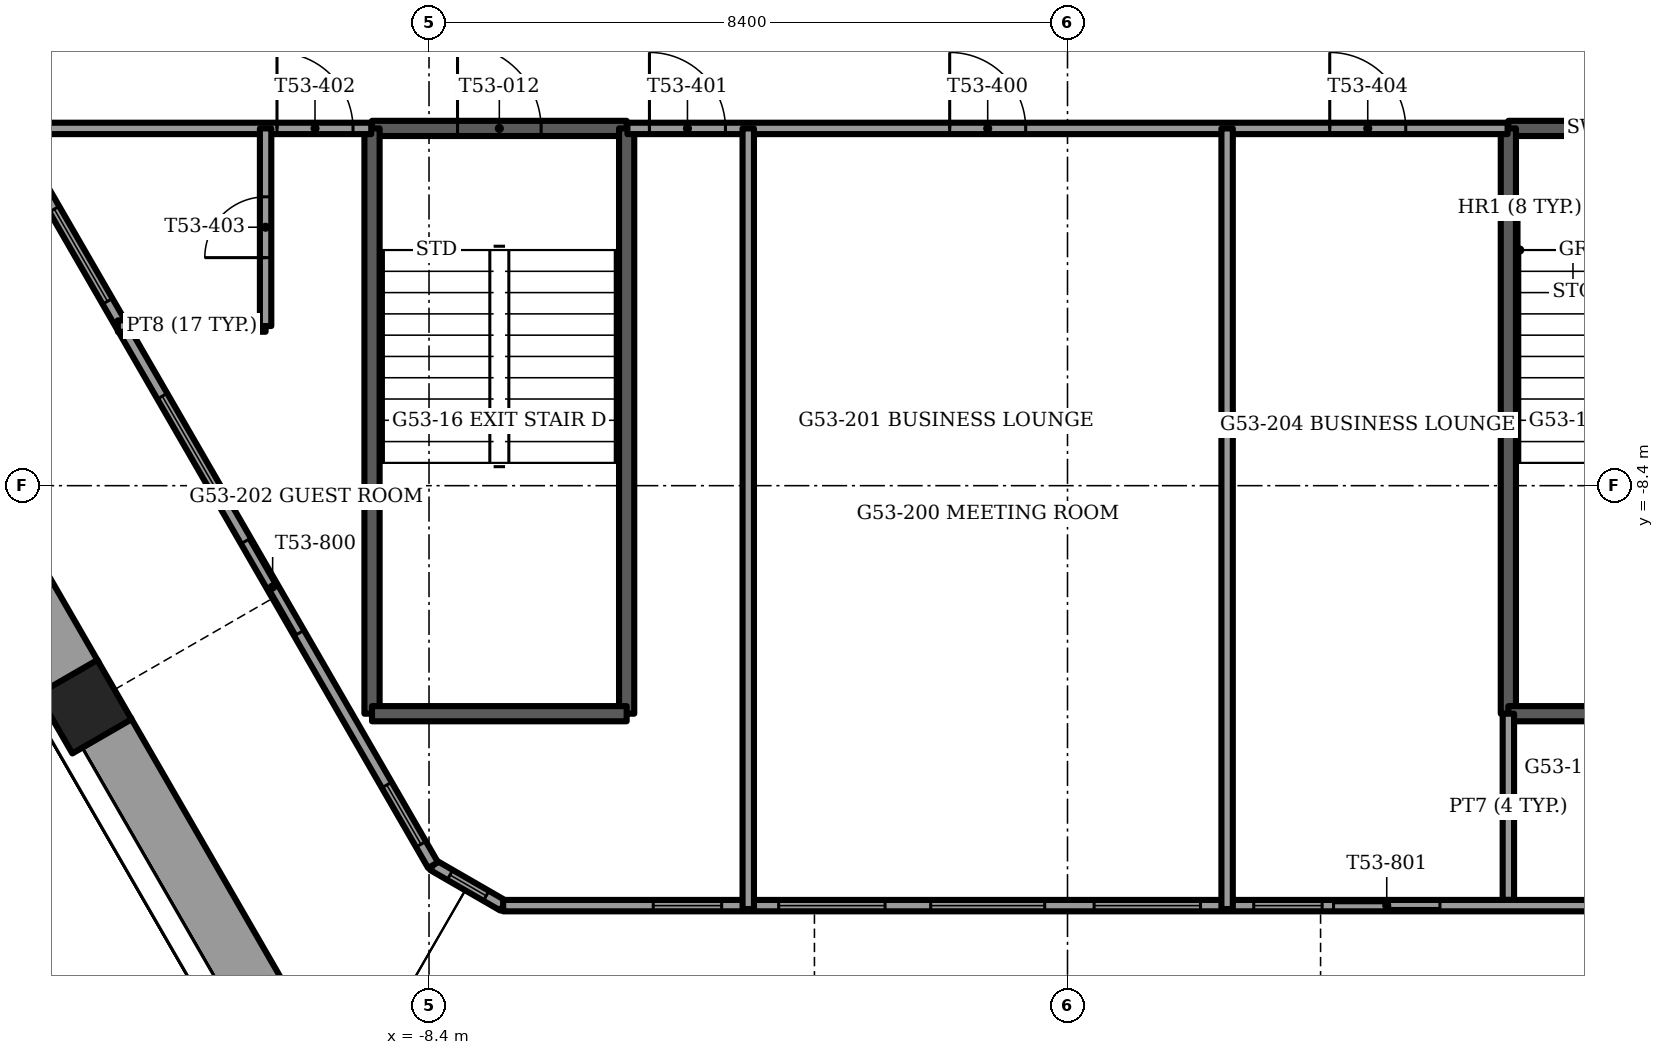
"""IFC4 building model, lengths in metres.
Left out: names, types, materials, properties, quantities, classifications, styles, units other than length and angle.
Written with IfcOpenShell. Run it as: python <this file> out.ifc"""

import sys

from ifc_helpers import new_model, si_unit, direction, frame, frame_2d, origin, origin_2d, place, context, subcontext, project, spatial, rectangle, extrude, element, fill, save


model = new_model("IFC4")
c1 = context("Model", 3, precision=1e-05, world=origin(), true_north=direction((0.0, 1.0)))
c2 = subcontext(c1, "Body", "Model", "MODEL_VIEW")
j1 = project(units=[si_unit("LENGTHUNIT", "METRE"), si_unit("PLANEANGLEUNIT", "RADIAN")], contexts=[c1])
p1 = place(None, origin())
s1 = spatial("IfcSite", under=j1, at=p1, CompositionType="ELEMENT")
p2 = place(p1, origin())
s2 = spatial("IfcBuilding", under=s1, at=p2, CompositionType="ELEMENT")
p3 = place(p2, frame((0.0, 0.0, 214.5)))
s3 = spatial("IfcBuildingStorey", under=s2, at=p3, CompositionType="ELEMENT", Elevation=214.5)
p4 = place(p3, frame((-12.928, -11.308, -1.2), z_axis=(0.0, 0.0, 1.0), x_axis=(-0.5, 0.866025403784, 0.0)))
e1 = element("IfcColumn", 1, at=p4, inside=s3, PredefinedType="COLUMN", context=c2, shape_type="SweptSolid", body=[
    extrude(rectangle(XDim=0.9, YDim=0.9, at=origin_2d()), origin(), (0.0, 0.0, 1.0), 3.75),
])
p5 = place(p3, frame((-16.047, -5.906, 0.0), z_axis=(0.0, 0.0, 1.0), x_axis=(0.500015433515, -0.866016493057, 0.0)))
e2 = element("IfcWall", 2, at=p5, inside=s3, PredefinedType="PARAPET", context=c2, shape_type="SweptSolid", body=[
    extrude(rectangle(XDim=5.819, YDim=0.9, at=frame_2d((2.909, 0.0))), origin(), (0.0, 0.0, 1.0), 1.1),
])
p6 = place(p3, frame((-12.718, -11.672, 0.0), z_axis=(0.0, 0.0, 1.0), x_axis=(0.50000722722, -0.866021231107, 0.0)))
e3 = element("IfcWall", 3, at=p6, inside=s3, PredefinedType="PARAPET", context=c2, shape_type="SweptSolid", body=[
    extrude(rectangle(XDim=5.492, YDim=0.9, at=frame_2d((2.746, 0.0))), origin(), (0.0, 0.0, 1.0), 1.1),
])
p7 = place(p3, frame((-15.772, -0.532, 0.0), z_axis=(0.0, 0.0, 1.0), x_axis=(0.500000919504, -0.866024872908, 0.0)))
e4 = element("IfcWall", 4, at=p7, inside=s3, PredefinedType="SOLIDWALL", context=c2, shape_type="SweptSolid", body=[
    extrude(rectangle(XDim=14.85, YDim=0.15, at=frame_2d((7.425, 0.0))), origin(), (0.0, 0.0, 1.0), 3.45),
])
p8 = place(p7, frame((4.884, 0.0, 0.15)))
e5 = element("IfcOpeningElement", 5, at=p8, cuts=e4, PredefinedType="OPENING", context=c2, shape_type="SweptSolid", body=[
    extrude(rectangle(XDim=1.4, YDim=2.85, at=frame_2d((0.7, 1.425))), frame((0.0, 0.075, 0.0), z_axis=(0.0, -1.0, 0.0), x_axis=(1.0, 0.0, 0.0)), (0.0, 0.0, 1.0), 0.15),
])
p9 = place(p7, frame((7.725, 0.0, 0.15)))
e6 = element("IfcOpeningElement", 6, at=p9, cuts=e4, PredefinedType="OPENING", context=c2, shape_type="SweptSolid", body=[
    extrude(rectangle(XDim=1.5, YDim=2.85, at=frame_2d((0.75, 1.425))), frame((0.0, 0.075, 0.0), z_axis=(0.0, -1.0, 0.0), x_axis=(1.0, 0.0, 0.0)), (0.0, 0.0, 1.0), 0.15),
])
p10 = place(p7, frame((9.925, 0.0, 0.0)))
e7 = element("IfcOpeningElement", 7, at=p10, cuts=e4, PredefinedType="OPENING", context=c2, shape_type="SweptSolid", body=[
    extrude(rectangle(XDim=1.4, YDim=2.4, at=frame_2d((0.7, 1.2))), frame((0.0, 0.075, 0.0), z_axis=(0.0, -1.0, 0.0), x_axis=(1.0, 0.0, 0.0)), (0.0, 0.0, 1.0), 0.15),
])
p11 = place(p7, frame((0.812, 0.0, 0.15)))
e8 = element("IfcOpeningElement", 8, at=p11, cuts=e4, PredefinedType="OPENING", context=c2, shape_type="SweptSolid", body=[
    extrude(rectangle(XDim=1.5, YDim=2.73, at=frame_2d((0.75, 1.365))), frame((0.0, 0.075, 0.0), z_axis=(0.0, -1.0, 0.0), x_axis=(1.0, 0.0, 0.0)), (0.0, 0.0, 1.0), 0.15),
])
p12 = place(p7, frame((13.632, 0.0, 0.15)))
e9 = element("IfcOpeningElement", 9, at=p12, cuts=e4, PredefinedType="OPENING", context=c2, shape_type="SweptSolid", body=[
    extrude(rectangle(XDim=0.9, YDim=2.73, at=frame_2d((0.45, 1.365))), frame((0.0, 0.075, 0.0), z_axis=(0.0, -1.0, 0.0), x_axis=(1.0, 0.0, 0.0)), (0.0, 0.0, 1.0), 0.15),
])
p13 = place(p3, frame((-7.425, -13.925, 0.0), z_axis=(0.0, 0.0, 1.0), x_axis=(1.0, 0.0, 0.0)))
e10 = element("IfcWall", 10, at=p13, inside=s3, PredefinedType="SOLIDWALL", context=c2, shape_type="SweptSolid", body=[
    extrude(rectangle(XDim=14.85, YDim=0.15, at=frame_2d((7.425, 0.0))), origin(), (0.0, 0.0, 1.0), 3.45),
])
p14 = place(p13, frame((1.975, 0.0, 0.15)))
e11 = element("IfcOpeningElement", 11, at=p14, cuts=e10, PredefinedType="OPENING", context=c2, shape_type="SweptSolid", body=[
    extrude(rectangle(XDim=0.9, YDim=2.85, at=frame_2d((0.45, 1.425))), frame((0.0, 0.075, 0.0), z_axis=(0.0, -1.0, 0.0), x_axis=(1.0, 0.0, 0.0)), (0.0, 0.0, 1.0), 0.15),
])
p15 = place(p13, frame((3.625, 0.0, 0.15)))
e12 = element("IfcOpeningElement", 12, at=p15, cuts=e10, PredefinedType="OPENING", context=c2, shape_type="SweptSolid", body=[
    extrude(rectangle(XDim=1.4, YDim=2.85, at=frame_2d((0.7, 1.425))), frame((0.0, 0.075, 0.0), z_axis=(0.0, -1.0, 0.0), x_axis=(1.0, 0.0, 0.0)), (0.0, 0.0, 1.0), 0.15),
])
p16 = place(p13, frame((5.625, 0.0, 0.15)))
e13 = element("IfcOpeningElement", 13, at=p16, cuts=e10, PredefinedType="OPENING", context=c2, shape_type="SweptSolid", body=[
    extrude(rectangle(XDim=1.5, YDim=2.85, at=frame_2d((0.75, 1.425))), frame((0.0, 0.075, 0.0), z_axis=(0.0, -1.0, 0.0), x_axis=(1.0, 0.0, 0.0)), (0.0, 0.0, 1.0), 0.15),
])
p17 = place(p13, frame((7.775, 0.0, 0.15)))
e14 = element("IfcOpeningElement", 14, at=p17, cuts=e10, PredefinedType="OPENING", context=c2, shape_type="SweptSolid", body=[
    extrude(rectangle(XDim=1.4, YDim=2.85, at=frame_2d((0.7, 1.425))), frame((0.0, 0.075, 0.0), z_axis=(0.0, -1.0, 0.0), x_axis=(1.0, 0.0, 0.0)), (0.0, 0.0, 1.0), 0.15),
])
p18 = place(p13, frame((9.875, 0.0, 0.15)))
e15 = element("IfcOpeningElement", 15, at=p18, cuts=e10, PredefinedType="OPENING", context=c2, shape_type="SweptSolid", body=[
    extrude(rectangle(XDim=0.9, YDim=2.85, at=frame_2d((0.45, 1.425))), frame((0.0, 0.075, 0.0), z_axis=(0.0, -1.0, 0.0), x_axis=(1.0, 0.0, 0.0)), (0.0, 0.0, 1.0), 0.15),
])
p19 = place(p13, frame((10.925, 0.0, 0.0)))
e16 = element("IfcOpeningElement", 16, at=p19, cuts=e10, PredefinedType="OPENING", context=c2, shape_type="SweptSolid", body=[
    extrude(rectangle(XDim=1.4, YDim=2.4, at=frame_2d((0.7, 1.2))), frame((0.0, 0.075, 0.0), z_axis=(0.0, -1.0, 0.0), x_axis=(1.0, 0.0, 0.0)), (0.0, 0.0, 1.0), 0.15),
])
p20 = place(p3, frame((-8.347, -13.393, 0.0), z_axis=(0.0, 0.0, 1.0), x_axis=(0.865990848561, -0.500059846627, 0.0)))
e17 = element("IfcWall", 17, at=p20, inside=s3, PredefinedType="SOLIDWALL", context=c2, shape_type="SweptSolid", body=[
    extrude(rectangle(XDim=1.065, YDim=0.15, at=frame_2d((0.532, 0.0))), origin(), (0.0, 0.0, 1.0), 3.45),
])
p21 = place(p20, frame((0.258, 0.0, 0.15)))
e18 = element("IfcOpeningElement", 18, at=p21, cuts=e17, PredefinedType="OPENING", context=c2, shape_type="SweptSolid", body=[
    extrude(rectangle(XDim=0.55, YDim=2.85, at=frame_2d((0.275, 1.425))), frame((0.0, 0.075, 0.0), z_axis=(0.0, -1.0, 0.0), x_axis=(1.0, 0.0, 0.0)), (0.0, 0.0, 1.0), 0.15),
])
p22 = place(p3, frame((5.8, -3.7, -0.3), z_axis=(0.0, 0.0, 1.0), x_axis=(1.0, 0.0, 0.0)))
e19 = element("IfcWall", 19, at=p22, inside=s3, PredefinedType="SOLIDWALL", context=c2, shape_type="SweptSolid", body=[
    extrude(rectangle(XDim=3.35, YDim=0.2, at=frame_2d((1.675, 0.0))), origin(), (0.0, 0.0, 1.0), 3.75),
])
p23 = place(p22, frame((1.125, 0.0, 0.0)))
e20 = element("IfcOpeningElement", 20, at=p23, cuts=e19, PredefinedType="OPENING", context=c2, shape_type="SweptSolid", body=[
    extrude(rectangle(XDim=1.1, YDim=2.1, at=frame_2d((0.55, 1.05))), frame((0.0, 0.1, 0.0), z_axis=(0.0, -1.0, 0.0), x_axis=(1.0, 0.0, 0.0)), (0.0, 0.0, 1.0), 0.2),
])
p24 = place(p3, frame((5.8, -3.7, -0.3), z_axis=(0.0, 0.0, 1.0), x_axis=(0.0, -1.0, 0.0)))
e21 = element("IfcWall", 21, at=p24, inside=s3, PredefinedType="SOLIDWALL", context=c2, shape_type="SweptSolid", body=[
    extrude(rectangle(XDim=7.7, YDim=0.2, at=frame_2d((3.85, 0.0))), origin(), (0.0, 0.0, 1.0), 3.75),
])
p25 = place(p3, frame((5.8, -11.4, -0.3), z_axis=(0.0, 0.0, 1.0), x_axis=(1.0, 0.0, 0.0)))
e22 = element("IfcWall", 22, at=p25, inside=s3, PredefinedType="SOLIDWALL", context=c2, shape_type="SweptSolid", body=[
    extrude(rectangle(XDim=3.35, YDim=0.2, at=frame_2d((1.675, 0.0))), origin(), (0.0, 0.0, 1.0), 3.75),
])
p26 = place(p3, frame((5.8, -11.4, 0.0), z_axis=(0.0, 0.0, 1.0), x_axis=(0.0, -1.0, 0.0)))
e23 = element("IfcWall", 23, at=p26, inside=s3, PredefinedType="PARTITIONING", context=c2, shape_type="SweptSolid", body=[
    extrude(rectangle(XDim=2.45, YDim=0.15, at=frame_2d((1.225, 0.0))), origin(), (0.0, 0.0, 1.0), 3.45),
])
p27 = place(p3, frame((-9.15, -3.7, -0.3), z_axis=(0.0, 0.0, 1.0), x_axis=(1.0, 0.0, 0.0)))
e24 = element("IfcWall", 24, at=p27, inside=s3, PredefinedType="SOLIDWALL", context=c2, shape_type="SweptSolid", body=[
    extrude(rectangle(XDim=3.35, YDim=0.2, at=frame_2d((1.675, 0.0))), origin(), (0.0, 0.0, 1.0), 3.75),
])
p28 = place(p27, frame((1.125, 0.0, 0.0)))
e25 = element("IfcOpeningElement", 25, at=p28, cuts=e24, PredefinedType="OPENING", context=c2, shape_type="SweptSolid", body=[
    extrude(rectangle(XDim=1.1, YDim=2.1, at=frame_2d((0.55, 1.05))), frame((0.0, 0.1, 0.0), z_axis=(0.0, -1.0, 0.0), x_axis=(1.0, 0.0, 0.0)), (0.0, 0.0, 1.0), 0.2),
])
for number, where, z_axis, x_axis in (
    (26, (-9.15, -3.7, -0.3), (0.0, 0.0, 1.0), (0.0, -1.0, 0.0)),
    (27, (-5.8, -3.7, -0.3), (0.0, 0.0, 1.0), (0.0, -1.0, 0.0)),
):
    element("IfcWall", number, at=place(p3, frame(where, z_axis=z_axis, x_axis=x_axis)), inside=s3, PredefinedType="SOLIDWALL", context=c2, shape_type="SweptSolid", body=[
        extrude(rectangle(XDim=7.7, YDim=0.2, at=frame_2d((3.85, 0.0))), origin(), (0.0, 0.0, 1.0), 3.75),
    ])
p29 = place(p3, frame((-9.15, -11.4, -0.3), z_axis=(0.0, 0.0, 1.0), x_axis=(1.0, 0.0, 0.0)))
e28 = element("IfcWall", 28, at=p29, inside=s3, PredefinedType="SOLIDWALL", context=c2, shape_type="SweptSolid", body=[
    extrude(rectangle(XDim=3.35, YDim=0.2, at=frame_2d((1.675, 0.0))), origin(), (0.0, 0.0, 1.0), 3.75),
])
p30 = place(p3, frame((-12.494, -6.3, 0.0), z_axis=(0.0, 0.0, 1.0), x_axis=(1.0, 0.0, 0.0)))
e29 = element("IfcWall", 29, at=p30, inside=s3, PredefinedType="PARTITIONING", context=c2, shape_type="SweptSolid", body=[
    extrude(rectangle(XDim=1.944, YDim=0.15, at=frame_2d((0.972, 0.0))), origin(), (0.0, 0.0, 1.0), 3.45),
])
p31 = place(p3, frame((-13.995, -3.7, 0.0), z_axis=(0.0, 0.0, 1.0), x_axis=(1.0, 0.0, 0.0)))
e30 = element("IfcWall", 30, at=p31, inside=s3, PredefinedType="PARTITIONING", context=c2, shape_type="SweptSolid", body=[
    extrude(rectangle(XDim=4.835, YDim=0.15, at=frame_2d((2.417, 0.0))), origin(), (0.0, 0.0, 1.0), 3.45),
])
p32 = place(p31, frame((3.595, 0.0, 0.0)))
e31 = element("IfcOpeningElement", 31, at=p32, cuts=e30, PredefinedType="OPENING", context=c2, shape_type="SweptSolid", body=[
    extrude(rectangle(XDim=1.0, YDim=2.1, at=frame_2d((0.5, 1.05))), frame((0.0, 0.075, 0.0), z_axis=(0.0, -1.0, 0.0), x_axis=(1.0, 0.0, 0.0)), (0.0, 0.0, 1.0), 0.15),
])
p33 = place(p3, frame((-5.79, -3.7, 0.0), z_axis=(0.0, 0.0, 1.0), x_axis=(1.0, 0.0, 0.0)))
e32 = element("IfcWall", 32, at=p33, inside=s3, PredefinedType="PARTITIONING", context=c2, shape_type="SweptSolid", body=[
    extrude(rectangle(XDim=11.58, YDim=0.15, at=frame_2d((5.79, 0.0))), origin(), (0.0, 0.0, 1.0), 3.45),
])
p34 = place(p33, frame((4.24, 0.0, 0.0)))
e33 = element("IfcOpeningElement", 33, at=p34, cuts=e32, PredefinedType="OPENING", context=c2, shape_type="SweptSolid", body=[
    extrude(rectangle(XDim=1.0, YDim=2.1, at=frame_2d((0.5, 1.05))), frame((0.0, 0.075, 0.0), z_axis=(0.0, -1.0, 0.0), x_axis=(1.0, 0.0, 0.0)), (0.0, 0.0, 1.0), 0.15),
])
p35 = place(p33, frame((0.29, 0.0, 0.0)))
e34 = element("IfcOpeningElement", 34, at=p35, cuts=e32, PredefinedType="OPENING", context=c2, shape_type="SweptSolid", body=[
    extrude(rectangle(XDim=1.0, YDim=2.1, at=frame_2d((0.5, 1.05))), frame((0.0, 0.075, 0.0), z_axis=(0.0, -1.0, 0.0), x_axis=(1.0, 0.0, 0.0)), (0.0, 0.0, 1.0), 0.15),
])
p36 = place(p33, frame((9.24, 0.0, 0.0)))
e35 = element("IfcOpeningElement", 35, at=p36, cuts=e32, PredefinedType="OPENING", context=c2, shape_type="SweptSolid", body=[
    extrude(rectangle(XDim=1.0, YDim=2.1, at=frame_2d((0.5, 1.05))), frame((0.0, 0.075, 0.0), z_axis=(0.0, -1.0, 0.0), x_axis=(1.0, 0.0, 0.0)), (0.0, 0.0, 1.0), 0.15),
])
for number, where, z_axis, x_axis in (
    (36, (2.1, -13.97, 0.0), (0.0, 0.0, 1.0), (0.0, 1.0, 0.0)),
    (37, (-4.2, -13.97, 0.0), (0.0, 0.0, 1.0), (0.0, 1.0, 0.0)),
):
    element("IfcWall", number, at=place(p3, frame(where, z_axis=z_axis, x_axis=x_axis)), inside=s3, PredefinedType="PARTITIONING", context=c2, shape_type="SweptSolid", body=[
        extrude(rectangle(XDim=10.27, YDim=0.15, at=frame_2d((5.135, 0.0))), origin(), (0.0, 0.0, 1.0), 3.45),
    ])
p37 = place(p3, frame((-10.55, -6.3, 0.0), z_axis=(0.0, 0.0, 1.0), x_axis=(0.0, 1.0, 0.0)))
e38 = element("IfcWall", 38, at=p37, inside=s3, PredefinedType="PARTITIONING", context=c2, shape_type="SweptSolid", body=[
    extrude(rectangle(XDim=2.6, YDim=0.15, at=frame_2d((1.3, 0.0))), origin(), (0.0, 0.0, 1.0), 3.45),
])
p38 = place(p37, frame((0.9, 0.0, 0.0)))
e39 = element("IfcOpeningElement", 39, at=p38, cuts=e38, PredefinedType="OPENING", context=c2, shape_type="SweptSolid", body=[
    extrude(rectangle(XDim=0.8, YDim=2.1, at=frame_2d((0.4, 1.05))), frame((0.0, 0.075, 0.0), z_axis=(0.0, -1.0, 0.0), x_axis=(1.0, 0.0, 0.0)), (0.0, 0.0, 1.0), 0.15),
])
p39 = place(p8, origin())
e40 = element("IfcWindow", 40, at=p39, inside=s3, PartitioningType="SINGLE_PANEL", PredefinedType="WINDOW", context=c2, shape_type="SweptSolid", body=[
    extrude(rectangle(XDim=1.4, YDim=2.85, at=frame_2d((0.7, 1.425))), frame((0.0, 0.03, 0.0), z_axis=(0.0, -1.0, 0.0), x_axis=(1.0, 0.0, 0.0)), (0.0, 0.0, 1.0), 0.06),
])
fill(e5, e40)
p40 = place(p9, origin())
e41 = element("IfcWindow", 41, at=p40, inside=s3, PartitioningType="SINGLE_PANEL", PredefinedType="WINDOW", context=c2, shape_type="SweptSolid", body=[
    extrude(rectangle(XDim=1.5, YDim=2.85, at=frame_2d((0.75, 1.425))), frame((0.0, 0.03, 0.0), z_axis=(0.0, -1.0, 0.0), x_axis=(1.0, 0.0, 0.0)), (0.0, 0.0, 1.0), 0.06),
])
fill(e6, e41)
p41 = place(p10, origin())
e42 = element("IfcDoor", 42, at=p41, inside=s3, OperationType="SLIDING_TO_RIGHT", PredefinedType="DOOR", context=c2, shape_type="SweptSolid", body=[
    extrude(rectangle(XDim=1.4, YDim=2.4, at=frame_2d((0.7, 1.2))), frame((0.0, 0.025, 0.0), z_axis=(0.0, -1.0, 0.0), x_axis=(1.0, 0.0, 0.0)), (0.0, 0.0, 1.0), 0.05),
])
fill(e7, e42)
p42 = place(p12, origin())
e43 = element("IfcWindow", 43, at=p42, inside=s3, PartitioningType="SINGLE_PANEL", PredefinedType="WINDOW", context=c2, shape_type="SweptSolid", body=[
    extrude(rectangle(XDim=0.9, YDim=2.73, at=frame_2d((0.45, 1.365))), frame((0.0, 0.03, 0.0), z_axis=(0.0, -1.0, 0.0), x_axis=(1.0, 0.0, 0.0)), (0.0, 0.0, 1.0), 0.06),
])
fill(e9, e43)
p43 = place(p14, origin())
e44 = element("IfcWindow", 44, at=p43, inside=s3, PartitioningType="SINGLE_PANEL", PredefinedType="WINDOW", context=c2, shape_type="SweptSolid", body=[
    extrude(rectangle(XDim=0.9, YDim=2.85, at=frame_2d((0.45, 1.425))), frame((0.0, 0.03, 0.0), z_axis=(0.0, -1.0, 0.0), x_axis=(1.0, 0.0, 0.0)), (0.0, 0.0, 1.0), 0.06),
])
fill(e11, e44)
p44 = place(p15, origin())
e45 = element("IfcWindow", 45, at=p44, inside=s3, PartitioningType="SINGLE_PANEL", PredefinedType="WINDOW", context=c2, shape_type="SweptSolid", body=[
    extrude(rectangle(XDim=1.4, YDim=2.85, at=frame_2d((0.7, 1.425))), frame((0.0, 0.03, 0.0), z_axis=(0.0, -1.0, 0.0), x_axis=(1.0, 0.0, 0.0)), (0.0, 0.0, 1.0), 0.06),
])
fill(e12, e45)
p45 = place(p16, origin())
e46 = element("IfcWindow", 46, at=p45, inside=s3, PartitioningType="SINGLE_PANEL", PredefinedType="WINDOW", context=c2, shape_type="SweptSolid", body=[
    extrude(rectangle(XDim=1.5, YDim=2.85, at=frame_2d((0.75, 1.425))), frame((0.0, 0.03, 0.0), z_axis=(0.0, -1.0, 0.0), x_axis=(1.0, 0.0, 0.0)), (0.0, 0.0, 1.0), 0.06),
])
fill(e13, e46)
p46 = place(p17, origin())
e47 = element("IfcWindow", 47, at=p46, inside=s3, PartitioningType="SINGLE_PANEL", PredefinedType="WINDOW", context=c2, shape_type="SweptSolid", body=[
    extrude(rectangle(XDim=1.4, YDim=2.85, at=frame_2d((0.7, 1.425))), frame((0.0, 0.03, 0.0), z_axis=(0.0, -1.0, 0.0), x_axis=(1.0, 0.0, 0.0)), (0.0, 0.0, 1.0), 0.06),
])
fill(e14, e47)
p47 = place(p18, origin())
e48 = element("IfcWindow", 48, at=p47, inside=s3, PartitioningType="SINGLE_PANEL", PredefinedType="WINDOW", context=c2, shape_type="SweptSolid", body=[
    extrude(rectangle(XDim=0.9, YDim=2.85, at=frame_2d((0.45, 1.425))), frame((0.0, 0.03, 0.0), z_axis=(0.0, -1.0, 0.0), x_axis=(1.0, 0.0, 0.0)), (0.0, 0.0, 1.0), 0.06),
])
fill(e15, e48)
p48 = place(p19, origin())
e49 = element("IfcDoor", 49, at=p48, inside=s3, OperationType="SLIDING_TO_LEFT", PredefinedType="DOOR", context=c2, shape_type="SweptSolid", body=[
    extrude(rectangle(XDim=1.4, YDim=2.4, at=frame_2d((0.7, 1.2))), frame((0.0, 0.025, 0.0), z_axis=(0.0, -1.0, 0.0), x_axis=(1.0, 0.0, 0.0)), (0.0, 0.0, 1.0), 0.05),
])
fill(e16, e49)
p49 = place(p21, origin())
e50 = element("IfcWindow", 50, at=p49, inside=s3, PartitioningType="SINGLE_PANEL", PredefinedType="WINDOW", context=c2, shape_type="SweptSolid", body=[
    extrude(rectangle(XDim=0.55, YDim=2.85, at=frame_2d((0.275, 1.425))), frame((0.0, 0.03, 0.0), z_axis=(0.0, -1.0, 0.0), x_axis=(1.0, 0.0, 0.0)), (0.0, 0.0, 1.0), 0.06),
])
fill(e18, e50)
p50 = place(p28, origin())
e51 = element("IfcDoor", 51, at=p50, inside=s3, OperationType="SINGLE_SWING_LEFT", PredefinedType="DOOR", context=c2, shape_type="SweptSolid", body=[
    extrude(rectangle(XDim=1.1, YDim=2.1, at=frame_2d((0.55, 1.05))), frame((0.0, 0.025, 0.0), z_axis=(0.0, -1.0, 0.0), x_axis=(1.0, 0.0, 0.0)), (0.0, 0.0, 1.0), 0.05),
])
fill(e25, e51)
p51 = place(p34, origin())
e52 = element("IfcDoor", 52, at=p51, inside=s3, OperationType="SINGLE_SWING_LEFT", PredefinedType="DOOR", context=c2, shape_type="SweptSolid", body=[
    extrude(rectangle(XDim=1.0, YDim=2.1, at=frame_2d((0.5, 1.05))), frame((0.0, 0.025, 0.0), z_axis=(0.0, -1.0, 0.0), x_axis=(1.0, 0.0, 0.0)), (0.0, 0.0, 1.0), 0.05),
])
fill(e33, e52)
p52 = place(p35, origin())
e53 = element("IfcDoor", 53, at=p52, inside=s3, OperationType="SINGLE_SWING_RIGHT", PredefinedType="DOOR", context=c2, shape_type="SweptSolid", body=[
    extrude(rectangle(XDim=1.0, YDim=2.1, at=frame_2d((0.5, 1.05))), frame((0.0, 0.025, 0.0), z_axis=(0.0, -1.0, 0.0), x_axis=(1.0, 0.0, 0.0)), (0.0, 0.0, 1.0), 0.05),
])
fill(e34, e53)
p53 = place(p32, origin())
e54 = element("IfcDoor", 54, at=p53, inside=s3, OperationType="SINGLE_SWING_RIGHT", PredefinedType="DOOR", context=c2, shape_type="SweptSolid", body=[
    extrude(rectangle(XDim=1.0, YDim=2.1, at=frame_2d((0.5, 1.05))), frame((0.0, 0.025, 0.0), z_axis=(0.0, -1.0, 0.0), x_axis=(1.0, 0.0, 0.0)), (0.0, 0.0, 1.0), 0.05),
])
fill(e31, e54)
p54 = place(p38, origin())
e55 = element("IfcDoor", 55, at=p54, inside=s3, OperationType="SINGLE_SWING_RIGHT", PredefinedType="DOOR", context=c2, shape_type="SweptSolid", body=[
    extrude(rectangle(XDim=0.8, YDim=2.1, at=frame_2d((0.4, 1.05))), frame((0.0, 0.025, 0.0), z_axis=(0.0, -1.0, 0.0), x_axis=(1.0, 0.0, 0.0)), (0.0, 0.0, 1.0), 0.05),
])
fill(e39, e55)
p55 = place(p36, origin())
e56 = element("IfcDoor", 56, at=p55, inside=s3, OperationType="SINGLE_SWING_LEFT", PredefinedType="DOOR", context=c2, shape_type="SweptSolid", body=[
    extrude(rectangle(XDim=1.0, YDim=2.1, at=frame_2d((0.5, 1.05))), frame((0.0, 0.025, 0.0), z_axis=(0.0, -1.0, 0.0), x_axis=(1.0, 0.0, 0.0)), (0.0, 0.0, 1.0), 0.05),
])
fill(e35, e56)
save(model, sys.argv[1])
